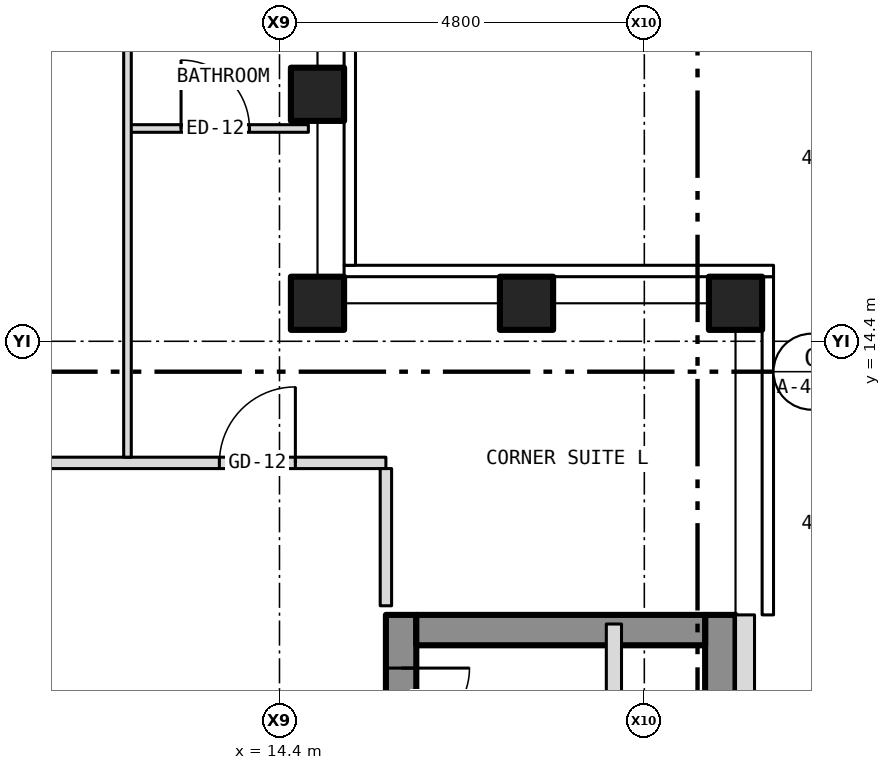
"""IFC4 building model, lengths in metres.
Left out: names, types, materials, properties, quantities, classifications, styles, units other than length and angle.
Written with IfcOpenShell. Run it as: python <this file> out.ifc"""

import sys

from ifc_helpers import new_model, si_unit, direction, frame, frame_2d, origin, origin_2d, place, context, subcontext, project, spatial, rectangle, hollow_rectangle, extrude, element, fill, save


model = new_model("IFC4")
c1 = context("Model", 3, precision=1e-05, world=origin(), true_north=direction((0.0, 1.0)))
c2 = subcontext(c1, "Body", "Model", "MODEL_VIEW")
j1 = project(units=[si_unit("LENGTHUNIT", "METRE"), si_unit("PLANEANGLEUNIT", "RADIAN")], contexts=[c1])
p1 = place(None, origin())
s1 = spatial("IfcSite", under=j1, at=p1, CompositionType="ELEMENT")
p2 = place(p1, origin())
s2 = spatial("IfcBuilding", under=s1, at=p2, CompositionType="ELEMENT")
p3 = place(p2, frame((0.0, 0.0, 201.5)))
s3 = spatial("IfcBuildingStorey", under=s2, at=p3, CompositionType="ELEMENT", Elevation=201.5)
for number, where, z_axis, x_axis in (
    (1, (20.4, 14.9, -0.15), (0.0, 0.0, 1.0), (1.0, 0.0, 0.0)),
    (2, (14.9, 14.9, -0.15), (0.0, 0.0, 1.0), (1.0, 0.0, 0.0)),
    (3, (14.9, 17.65, -0.15), (0.0, 0.0, 1.0), (1.0, 0.0, 0.0)),
    (4, (17.65, 14.9, -0.15), (0.0, 0.0, 1.0), (1.0, 0.0, 0.0)),
):
    element("IfcColumn", number, at=place(p3, frame(where, z_axis=z_axis, x_axis=x_axis)), inside=s3, PredefinedType="COLUMN", context=c2, shape_type="SweptSolid", body=[
        extrude(hollow_rectangle(XDim=0.7, YDim=0.7, WallThickness=0.04, at=origin_2d()), origin(), (0.0, 0.0, 1.0), 3.5),
    ])
p4 = place(p3, frame((16.0, -10.8, 0.0), z_axis=(0.0, 0.0, 1.0), x_axis=(0.0, 1.0, 0.0)))
e5 = element("IfcWall", 5, at=p4, inside=s3, PredefinedType="SHEAR", context=c2, shape_type="SweptSolid", body=[
    extrude(rectangle(XDim=21.6, YDim=0.4, at=frame_2d((10.8, 0.0))), origin(), (0.0, 0.0, 1.0), 3.25),
])
p5 = place(p4, frame((9.4, 0.0, 0.0)))
e6 = element("IfcOpeningElement", 6, at=p5, cuts=e5, PredefinedType="OPENING", context=c2, shape_type="SweptSolid", body=[
    extrude(rectangle(XDim=1.1, YDim=2.1, at=frame_2d((0.55, 1.05))), frame((0.0, 0.212, 0.0), z_axis=(0.0, -1.0, 0.0), x_axis=(1.0, 0.0, 0.0)), (0.0, 0.0, 1.0), 0.424),
])
p6 = place(p4, frame((11.5, 0.0, 0.0)))
e7 = element("IfcOpeningElement", 7, at=p6, cuts=e5, PredefinedType="OPENING", context=c2, shape_type="SweptSolid", body=[
    extrude(rectangle(XDim=1.1, YDim=2.1, at=frame_2d((0.55, 1.05))), frame((0.0, 0.212, 0.0), z_axis=(0.0, -1.0, 0.0), x_axis=(1.0, 0.0, 0.0)), (0.0, 0.0, 1.0), 0.424),
])
p7 = place(p4, frame((13.6, 0.0, 0.0)))
e8 = element("IfcOpeningElement", 8, at=p7, cuts=e5, PredefinedType="OPENING", context=c2, shape_type="SweptSolid", body=[
    extrude(rectangle(XDim=1.1, YDim=2.1, at=frame_2d((0.55, 1.05))), frame((0.0, 0.212, 0.0), z_axis=(0.0, -1.0, 0.0), x_axis=(1.0, 0.0, 0.0)), (0.0, 0.0, 1.0), 0.424),
])
p8 = place(p4, frame((15.7, 0.0, 0.0)))
e9 = element("IfcOpeningElement", 9, at=p8, cuts=e5, PredefinedType="OPENING", context=c2, shape_type="SweptSolid", body=[
    extrude(rectangle(XDim=1.1, YDim=2.1, at=frame_2d((0.55, 1.05))), frame((0.0, 0.212, 0.0), z_axis=(0.0, -1.0, 0.0), x_axis=(1.0, 0.0, 0.0)), (0.0, 0.0, 1.0), 0.424),
])
p9 = place(p4, frame((17.8, 0.0, 0.0)))
e10 = element("IfcOpeningElement", 10, at=p9, cuts=e5, PredefinedType="OPENING", context=c2, shape_type="SweptSolid", body=[
    extrude(rectangle(XDim=1.1, YDim=2.1, at=frame_2d((0.55, 1.05))), frame((0.0, 0.212, 0.0), z_axis=(0.0, -1.0, 0.0), x_axis=(1.0, 0.0, 0.0)), (0.0, 0.0, 1.0), 0.424),
])
p10 = place(p4, frame((5.642, 0.0, 0.0)))
e11 = element("IfcOpeningElement", 11, at=p10, cuts=e5, PredefinedType="OPENING", context=c2, shape_type="SweptSolid", body=[
    extrude(rectangle(XDim=1.1, YDim=2.1, at=frame_2d((0.55, 1.05))), frame((0.0, 0.212, 0.0), z_axis=(0.0, -1.0, 0.0), x_axis=(1.0, 0.0, 0.0)), (0.0, 0.0, 1.0), 0.424),
])
p11 = place(p4, frame((7.5, 0.0, 0.0)))
e12 = element("IfcOpeningElement", 12, at=p11, cuts=e5, PredefinedType="OPENING", context=c2, shape_type="SweptSolid", body=[
    extrude(rectangle(XDim=1.1, YDim=2.1, at=frame_2d((0.55, 1.05))), frame((0.0, 0.212, 0.0), z_axis=(0.0, -1.0, 0.0), x_axis=(1.0, 0.0, 0.0)), (0.0, 0.0, 1.0), 0.424),
])
p12 = place(p4, frame((20.0, 0.0, 0.0)))
e13 = element("IfcOpeningElement", 13, at=p12, cuts=e5, PredefinedType="OPENING", context=c2, shape_type="SweptSolid", body=[
    extrude(rectangle(XDim=0.9, YDim=2.1, at=frame_2d((0.45, 1.05))), frame((0.0, 0.212, 0.0), z_axis=(0.0, -1.0, 0.0), x_axis=(1.0, 0.0, 0.0)), (0.0, 0.0, 1.0), 0.424),
])
p13 = place(p3, frame((20.2, -10.8, 0.0), z_axis=(0.0, 0.0, 1.0), x_axis=(0.0, 1.0, 0.0)))
e14 = element("IfcWall", 14, at=p13, inside=s3, PredefinedType="SHEAR", context=c2, shape_type="SweptSolid", body=[
    extrude(rectangle(XDim=21.6, YDim=0.4, at=frame_2d((10.8, 0.0))), origin(), (0.0, 0.0, 1.0), 3.25),
])
p14 = place(p3, frame((16.2, 10.6, 0.0), z_axis=(0.0, 0.0, 1.0), x_axis=(1.0, 0.0, 0.0)))
e15 = element("IfcWall", 15, at=p14, inside=s3, PredefinedType="SHEAR", context=c2, shape_type="SweptSolid", body=[
    extrude(rectangle(XDim=3.8, YDim=0.4, at=frame_2d((1.9, 0.0))), origin(), (0.0, 0.0, 1.0), 3.25),
])
p15 = place(p3, frame((20.525, -10.8, 0.0), z_axis=(0.0, 0.0, 1.0), x_axis=(0.0, 1.0, 0.0)))
e16 = element("IfcWall", 16, at=p15, inside=s3, PredefinedType="SOLIDWALL", context=c2, shape_type="SweptSolid", body=[
    extrude(rectangle(XDim=21.6, YDim=0.25, at=frame_2d((10.8, 0.0))), origin(), (0.0, 0.0, 1.0), 3.5),
])
p16 = place(p15, frame((2.95, 0.0, 1.0)))
e17 = element("IfcOpeningElement", 17, at=p16, cuts=e16, PredefinedType="OPENING", context=c2, shape_type="SweptSolid", body=[
    extrude(rectangle(XDim=0.6, YDim=1.5, at=frame_2d((0.3, 0.75))), frame((0.0, 0.137, 0.0), z_axis=(0.0, -1.0, 0.0), x_axis=(1.0, 0.0, 0.0)), (0.0, 0.0, 1.0), 0.274),
])
p17 = place(p3, frame((-15.8, 12.8, 0.0), z_axis=(0.0, 0.0, 1.0), x_axis=(1.0, 0.0, 0.0)))
e18 = element("IfcWall", 18, at=p17, inside=s3, PredefinedType="PARTITIONING", context=c2, shape_type="SweptSolid", body=[
    extrude(rectangle(XDim=31.6, YDim=0.15, at=frame_2d((15.8, 0.0))), origin(), (0.0, 0.0, 1.0), 3.35),
])
p18 = place(p17, frame((4.267, 0.0, 0.0)))
e19 = element("IfcOpeningElement", 19, at=p18, cuts=e18, PredefinedType="OPENING", context=c2, shape_type="SweptSolid", body=[
    extrude(rectangle(XDim=1.0, YDim=2.1, at=frame_2d((0.5, 1.05))), frame((0.0, 0.087, 0.0), z_axis=(0.0, -1.0, 0.0), x_axis=(1.0, 0.0, 0.0)), (0.0, 0.0, 1.0), 0.174),
])
p19 = place(p17, frame((12.675, 0.0, 0.0)))
e20 = element("IfcOpeningElement", 20, at=p19, cuts=e18, PredefinedType="OPENING", context=c2, shape_type="SweptSolid", body=[
    extrude(rectangle(XDim=1.0, YDim=2.1, at=frame_2d((0.5, 1.05))), frame((0.0, 0.087, 0.0), z_axis=(0.0, -1.0, 0.0), x_axis=(1.0, 0.0, 0.0)), (0.0, 0.0, 1.0), 0.174),
])
p20 = place(p17, frame((16.684, 0.0, 0.0)))
e21 = element("IfcOpeningElement", 21, at=p20, cuts=e18, PredefinedType="OPENING", context=c2, shape_type="SweptSolid", body=[
    extrude(rectangle(XDim=1.0, YDim=2.1, at=frame_2d((0.5, 1.05))), frame((0.0, 0.087, 0.0), z_axis=(0.0, -1.0, 0.0), x_axis=(1.0, 0.0, 0.0)), (0.0, 0.0, 1.0), 0.174),
])
p21 = place(p17, frame((25.092, 0.0, 0.0)))
e22 = element("IfcOpeningElement", 22, at=p21, cuts=e18, PredefinedType="OPENING", context=c2, shape_type="SweptSolid", body=[
    extrude(rectangle(XDim=1.0, YDim=2.1, at=frame_2d((0.5, 1.05))), frame((0.0, 0.087, 0.0), z_axis=(0.0, -1.0, 0.0), x_axis=(1.0, 0.0, 0.0)), (0.0, 0.0, 1.0), 0.174),
])
p22 = place(p17, frame((1.192, 0.0, 0.0)))
e23 = element("IfcOpeningElement", 23, at=p22, cuts=e18, PredefinedType="OPENING", context=c2, shape_type="SweptSolid", body=[
    extrude(rectangle(XDim=1.0, YDim=2.1, at=frame_2d((0.5, 1.05))), frame((0.0, 0.087, 0.0), z_axis=(0.0, -1.0, 0.0), x_axis=(1.0, 0.0, 0.0)), (0.0, 0.0, 1.0), 0.174),
])
p23 = place(p17, frame((29.409, 0.0, 0.0)))
e24 = element("IfcOpeningElement", 24, at=p23, cuts=e18, PredefinedType="OPENING", context=c2, shape_type="SweptSolid", body=[
    extrude(rectangle(XDim=1.0, YDim=2.1, at=frame_2d((0.5, 1.05))), frame((0.0, 0.087, 0.0), z_axis=(0.0, -1.0, 0.0), x_axis=(1.0, 0.0, 0.0)), (0.0, 0.0, 1.0), 0.174),
])
p24 = place(p3, frame((12.4, 17.2, 0.0), z_axis=(0.0, 0.0, 1.0), x_axis=(1.0, 0.0, 0.0)))
e25 = element("IfcWall", 25, at=p24, inside=s3, PredefinedType="PARTITIONING", context=c2, shape_type="SweptSolid", body=[
    extrude(rectangle(XDim=2.38, YDim=0.1, at=frame_2d((1.19, 0.0))), origin(), (0.0, 0.0, 1.0), 3.35),
])
p25 = place(p24, frame((0.705, 0.0, 0.0)))
e26 = element("IfcOpeningElement", 26, at=p25, cuts=e25, PredefinedType="OPENING", context=c2, shape_type="SweptSolid", body=[
    extrude(rectangle(XDim=0.9, YDim=2.1, at=frame_2d((0.45, 1.05))), frame((0.0, 0.062, 0.0), z_axis=(0.0, -1.0, 0.0), x_axis=(1.0, 0.0, 0.0)), (0.0, 0.0, 1.0), 0.124),
])
p26 = place(p3, frame((12.4, 12.875, 0.0), z_axis=(0.0, 0.0, 1.0), x_axis=(0.0, 1.0, 0.0)))
e27 = element("IfcWall", 27, at=p26, inside=s3, PredefinedType="PARTITIONING", context=c2, shape_type="SweptSolid", body=[
    extrude(rectangle(XDim=7.905, YDim=0.1, at=frame_2d((3.953, 0.0))), origin(), (0.0, 0.0, 1.0), 3.35),
])
p27 = place(p3, frame((15.8, 10.92, 0.0), z_axis=(0.0, 0.0, 1.0), x_axis=(0.0, 1.0, 0.0)))
e28 = element("IfcWall", 28, at=p27, inside=s3, PredefinedType="PARTITIONING", context=c2, shape_type="SweptSolid", body=[
    extrude(rectangle(XDim=1.805, YDim=0.15, at=frame_2d((0.903, 0.0))), origin(), (0.0, 0.0, 1.0), 3.35),
])
p28 = place(p3, frame((18.8, -1.8, 0.0), z_axis=(0.0, 0.0, 1.0), x_axis=(0.0, 1.0, 0.0)))
e29 = element("IfcWall", 29, at=p28, inside=s3, PredefinedType="PARTITIONING", context=c2, shape_type="SweptSolid", body=[
    extrude(rectangle(XDim=12.48, YDim=0.2, at=frame_2d((6.24, 0.0))), origin(), (0.0, 0.0, 1.0), 3.25),
])
p29 = place(p12, origin())
e30 = element("IfcDoor", 30, at=p29, inside=s3, OperationType="SINGLE_SWING_RIGHT", PredefinedType="DOOR", context=c2, shape_type="SweptSolid", body=[
    extrude(rectangle(XDim=0.9, YDim=2.1, at=frame_2d((0.45, 1.05))), frame((0.0, 0.025, 0.0), z_axis=(0.0, -1.0, 0.0), x_axis=(1.0, 0.0, 0.0)), (0.0, 0.0, 1.0), 0.05),
])
fill(e13, e30)
p30 = place(p25, origin())
e31 = element("IfcDoor", 31, at=p30, inside=s3, OperationType="SINGLE_SWING_LEFT", PredefinedType="DOOR", context=c2, shape_type="SweptSolid", body=[
    extrude(rectangle(XDim=0.9, YDim=2.1, at=frame_2d((0.45, 1.05))), frame((0.0, 0.025, 0.0), z_axis=(0.0, -1.0, 0.0), x_axis=(1.0, 0.0, 0.0)), (0.0, 0.0, 1.0), 0.05),
])
fill(e26, e31)
p31 = place(p23, origin())
e32 = element("IfcDoor", 32, at=p31, inside=s3, OperationType="SINGLE_SWING_RIGHT", PredefinedType="DOOR", context=c2, shape_type="SweptSolid", body=[
    extrude(rectangle(XDim=1.0, YDim=2.1, at=frame_2d((0.5, 1.05))), frame((0.0, 0.025, 0.0), z_axis=(0.0, -1.0, 0.0), x_axis=(1.0, 0.0, 0.0)), (0.0, 0.0, 1.0), 0.05),
])
fill(e24, e32)
save(model, sys.argv[1])
